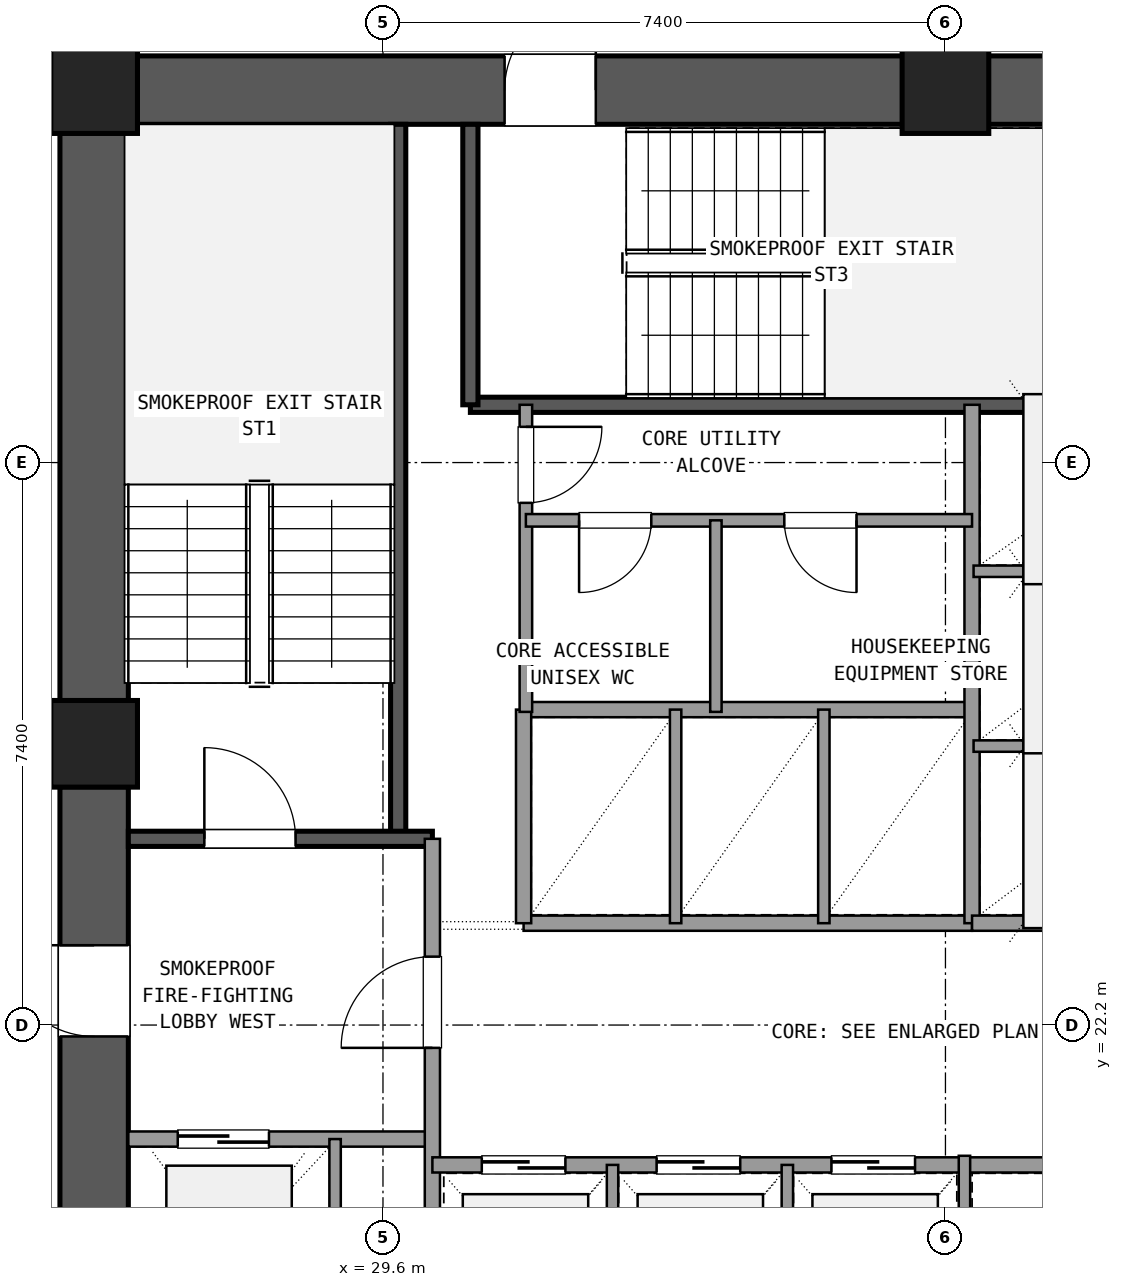
"""IFC4 building model, lengths in metres.
Left out: names, types, materials, properties, quantities, classifications, styles, units other than length and angle.
Written with IfcOpenShell. Run it as: python <this file> out.ifc"""

import sys

from ifc_helpers import new_model, si_unit, direction, frame, frame_2d, origin, origin_2d, place, context, subcontext, project, spatial, rectangle, extrude, element, fill, save


model = new_model("IFC4")
c1 = context("Model", 3, precision=1e-05, world=origin(), true_north=direction((0.0, 1.0)))
c2 = subcontext(c1, "Body", "Model", "MODEL_VIEW")
j1 = project(units=[si_unit("LENGTHUNIT", "METRE"), si_unit("PLANEANGLEUNIT", "RADIAN")], contexts=[c1])
p1 = place(None, origin())
s1 = spatial("IfcSite", under=j1, at=p1, CompositionType="ELEMENT")
p2 = place(p1, origin())
s2 = spatial("IfcBuilding", under=s1, at=p2, CompositionType="ELEMENT")
p3 = place(p2, frame((0.0, 0.0, 27.54)))
s3 = spatial("IfcBuildingStorey", under=s2, at=p3, CompositionType="ELEMENT", Elevation=27.54)
for number, where, z_axis, x_axis in (
    (1, (37.0, 34.5, 0.0), (0.0, 0.0, 1.0), (1.0, 0.0, 0.0)),
    (2, (25.8, 34.5, 0.0), (0.0, 0.0, 1.0), (1.0, 0.0, 0.0)),
    (3, (25.8, 25.9, 0.0), (0.0, 0.0, 1.0), (1.0, 0.0, 0.0)),
):
    element("IfcColumn", number, at=place(p3, frame(where, z_axis=z_axis, x_axis=x_axis)), inside=s3, PredefinedType="COLUMN", context=c2, shape_type="SweptSolid", body=[
        extrude(rectangle(XDim=1.14, YDim=1.14, at=origin_2d()), origin(), (0.0, 0.0, 1.0), 3.6),
    ])
p4 = place(p3, frame((47.635, 34.5, 0.0), z_axis=(0.0, 0.0, 1.0), x_axis=(-1.0, 0.0, 0.0)))
e4 = element("IfcWall", 4, at=p4, inside=s3, PredefinedType="SHEAR", context=c2, shape_type="SweptSolid", body=[
    extrude(rectangle(XDim=10.07, YDim=0.9, at=frame_2d((5.035, 0.0))), origin(), (0.0, 0.0, 1.0), 3.32),
])
p5 = place(p4, frame((4.535, 0.0, 0.0)))
e5 = element("IfcOpeningElement", 5, at=p5, cuts=e4, PredefinedType="OPENING", context=c2, shape_type="SweptSolid", body=[
    extrude(rectangle(XDim=1.6, YDim=2.2, at=frame_2d((0.8, 1.1))), frame((0.0, 0.46, 0.0), z_axis=(0.0, -1.0, 0.0), x_axis=(1.0, 0.0, 0.0)), (0.0, 0.0, 1.0), 0.92),
])
p6 = place(p3, frame((36.435, 34.5, 0.0), z_axis=(0.0, 0.0, 1.0), x_axis=(-1.0, 0.0, 0.0)))
e6 = element("IfcWall", 6, at=p6, inside=s3, PredefinedType="SHEAR", context=c2, shape_type="SweptSolid", body=[
    extrude(rectangle(XDim=10.07, YDim=0.9, at=frame_2d((5.035, 0.0))), origin(), (0.0, 0.0, 1.0), 3.32),
])
p7 = place(p6, frame((4.035, 0.0, 0.0)))
e7 = element("IfcOpeningElement", 7, at=p7, cuts=e6, PredefinedType="OPENING", context=c2, shape_type="SweptSolid", body=[
    extrude(rectangle(XDim=1.2, YDim=2.15, at=frame_2d((0.6, 1.075))), frame((0.0, 0.46, 0.0), z_axis=(0.0, -1.0, 0.0), x_axis=(1.0, 0.0, 0.0)), (0.0, 0.0, 1.0), 0.92),
])
p8 = place(p3, frame((25.8, 33.935, 0.0), z_axis=(0.0, 0.0, 1.0), x_axis=(0.0, -1.0, 0.0)))
e8 = element("IfcWall", 8, at=p8, inside=s3, PredefinedType="SHEAR", context=c2, shape_type="SweptSolid", body=[
    extrude(rectangle(XDim=7.47, YDim=0.9, at=frame_2d((3.735, 0.0))), origin(), (0.0, 0.0, 1.0), 3.32),
])
p9 = place(p3, frame((25.8, 25.335, 0.0), z_axis=(0.0, 0.0, 1.0), x_axis=(0.0, -1.0, 0.0)))
e9 = element("IfcWall", 9, at=p9, inside=s3, PredefinedType="SHEAR", context=c2, shape_type="SweptSolid", body=[
    extrude(rectangle(XDim=7.47, YDim=0.9, at=frame_2d((3.735, 0.0))), origin(), (0.0, 0.0, 1.0), 3.32),
])
p10 = place(p9, frame((2.085, 0.0, 0.0)))
e10 = element("IfcOpeningElement", 10, at=p10, cuts=e9, PredefinedType="OPENING", context=c2, shape_type="SweptSolid", body=[
    extrude(rectangle(XDim=1.2, YDim=2.15, at=frame_2d((0.6, 1.075))), frame((0.0, 0.46, 0.0), z_axis=(0.0, -1.0, 0.0), x_axis=(1.0, 0.0, 0.0)), (0.0, 0.0, 1.0), 0.92),
])
p11 = place(p3, frame((29.8, 24.65, 0.0), z_axis=(0.0, 0.0, 1.0), x_axis=(0.0, 1.0, 0.0)))
e11 = element("IfcWall", 11, at=p11, inside=s3, PredefinedType="SHEAR", context=c2, shape_type="SweptSolid", body=[
    extrude(rectangle(XDim=9.4, YDim=0.2, at=frame_2d((4.7, 0.0))), origin(), (0.0, 0.0, 1.0), 3.32),
])
p12 = place(p3, frame((26.25, 24.65, 0.0), z_axis=(0.0, 0.0, 1.0), x_axis=(1.0, 0.0, 0.0)))
e12 = element("IfcWall", 12, at=p12, inside=s3, PredefinedType="SHEAR", context=c2, shape_type="SweptSolid", body=[
    extrude(rectangle(XDim=4.0, YDim=0.2, at=frame_2d((2.0, 0.0))), origin(), (0.0, 0.0, 1.0), 3.32),
])
p13 = place(p12, frame((1.0, 0.0, 0.0)))
e13 = element("IfcOpeningElement", 13, at=p13, cuts=e12, PredefinedType="OPENING", context=c2, shape_type="SweptSolid", body=[
    extrude(rectangle(XDim=1.2, YDim=2.15, at=frame_2d((0.6, 1.075))), frame((0.0, 0.11, 0.0), z_axis=(0.0, -1.0, 0.0), x_axis=(1.0, 0.0, 0.0)), (0.0, 0.0, 1.0), 0.22),
])
p14 = place(p3, frame((30.75, 30.36, 0.0), z_axis=(0.0, 0.0, 1.0), x_axis=(1.0, 0.0, 0.0)))
e14 = element("IfcWall", 14, at=p14, inside=s3, PredefinedType="SHEAR", context=c2, shape_type="SweptSolid", body=[
    extrude(rectangle(XDim=9.5, YDim=0.2, at=frame_2d((4.75, 0.0))), origin(), (0.0, 0.0, 1.0), 3.32),
])
p15 = place(p3, frame((30.75, 30.36, 0.0), z_axis=(0.0, 0.0, 1.0), x_axis=(0.0, 1.0, 0.0)))
e15 = element("IfcWall", 15, at=p15, inside=s3, PredefinedType="SHEAR", context=c2, shape_type="SweptSolid", body=[
    extrude(rectangle(XDim=3.69, YDim=0.2, at=frame_2d((1.845, 0.0))), origin(), (0.0, 0.0, 1.0), 3.32),
])
p16 = place(p3, frame((26.25, 20.7, 0.0), z_axis=(0.0, 0.0, 1.0), x_axis=(1.0, 0.0, 0.0)))
e16 = element("IfcWall", 16, at=p16, inside=s3, PredefinedType="SOLIDWALL", context=c2, shape_type="SweptSolid", body=[
    extrude(rectangle(XDim=4.0, YDim=0.2, at=frame_2d((2.0, 0.0))), origin(), (0.0, 0.0, 1.0), 2.61),
])
p17 = place(p16, frame((0.65, 0.0, 0.0)))
e17 = element("IfcOpeningElement", 17, at=p17, cuts=e16, PredefinedType="OPENING", context=c2, shape_type="SweptSolid", body=[
    extrude(rectangle(XDim=1.2, YDim=2.15, at=frame_2d((0.6, 1.075))), frame((0.0, 0.11, 0.0), z_axis=(0.0, -1.0, 0.0), x_axis=(1.0, 0.0, 0.0)), (0.0, 0.0, 1.0), 0.22),
])
p18 = place(p3, frame((30.25, 17.75, 0.0), z_axis=(0.0, 0.0, 1.0), x_axis=(0.0, 1.0, 0.0)))
e18 = element("IfcWall", 18, at=p18, inside=s3, PredefinedType="SOLIDWALL", context=c2, shape_type="SweptSolid", body=[
    extrude(rectangle(XDim=6.9, YDim=0.2, at=frame_2d((3.45, 0.0))), origin(), (0.0, 0.0, 1.0), 2.61),
])
p19 = place(p18, frame((4.15, 0.0, 0.0)))
e19 = element("IfcOpeningElement", 19, at=p19, cuts=e18, PredefinedType="OPENING", context=c2, shape_type="SweptSolid", body=[
    extrude(rectangle(XDim=1.2, YDim=2.15, at=frame_2d((0.6, 1.075))), frame((0.0, 0.11, 0.0), z_axis=(0.0, -1.0, 0.0), x_axis=(1.0, 0.0, 0.0)), (0.0, 0.0, 1.0), 0.22),
])
p20 = place(p3, frame((28.97, 17.75, 0.0), z_axis=(0.0, 0.0, 1.0), x_axis=(0.0, 1.0, 0.0)))
e20 = element("IfcWall", 20, at=p20, inside=s3, PredefinedType="PARTITIONING", context=c2, shape_type="SweptSolid", body=[
    extrude(rectangle(XDim=2.95, YDim=0.15, at=frame_2d((1.475, 0.0))), origin(), (0.0, 0.0, 1.0), 2.61),
])
p21 = place(p3, frame((30.25, 20.36, 0.0), z_axis=(0.0, 0.0, 1.0), x_axis=(1.0, 0.0, 0.0)))
e21 = element("IfcWall", 21, at=p21, inside=s3, PredefinedType="SOLIDWALL", context=c2, shape_type="SweptSolid", body=[
    extrude(rectangle(XDim=7.0, YDim=0.2, at=frame_2d((3.5, 0.0))), origin(), (0.0, 0.0, 1.0), 2.61),
])
p22 = place(p21, frame((0.65, 0.0, 0.0)))
e22 = element("IfcOpeningElement", 22, at=p22, cuts=e21, PredefinedType="OPENING", context=c2, shape_type="SweptSolid", body=[
    extrude(rectangle(XDim=1.1, YDim=2.15, at=frame_2d((0.55, 1.075))), frame((0.0, 0.11, 0.0), z_axis=(0.0, -1.0, 0.0), x_axis=(1.0, 0.0, 0.0)), (0.0, 0.0, 1.0), 0.22),
])
p23 = place(p21, frame((2.95, 0.0, 0.0)))
e23 = element("IfcOpeningElement", 23, at=p23, cuts=e21, PredefinedType="OPENING", context=c2, shape_type="SweptSolid", body=[
    extrude(rectangle(XDim=1.1, YDim=2.15, at=frame_2d((0.55, 1.075))), frame((0.0, 0.11, 0.0), z_axis=(0.0, -1.0, 0.0), x_axis=(1.0, 0.0, 0.0)), (0.0, 0.0, 1.0), 0.22),
])
p24 = place(p21, frame((5.25, 0.0, 0.0)))
e24 = element("IfcOpeningElement", 24, at=p24, cuts=e21, PredefinedType="OPENING", context=c2, shape_type="SweptSolid", body=[
    extrude(rectangle(XDim=1.1, YDim=2.15, at=frame_2d((0.55, 1.075))), frame((0.0, 0.11, 0.0), z_axis=(0.0, -1.0, 0.0), x_axis=(1.0, 0.0, 0.0)), (0.0, 0.0, 1.0), 0.22),
])
for number, where, z_axis, x_axis in (
    (25, (32.62, 17.75, 0.0), (0.0, 0.0, 1.0), (0.0, 1.0, 0.0)),
    (26, (34.92, 17.75, 0.0), (0.0, 0.0, 1.0), (0.0, 1.0, 0.0)),
):
    element("IfcWall", number, at=place(p3, frame(where, z_axis=z_axis, x_axis=x_axis)), inside=s3, PredefinedType="PARTITIONING", context=c2, shape_type="SweptSolid", body=[
        extrude(rectangle(XDim=2.61, YDim=0.15, at=frame_2d((1.305, 0.0))), origin(), (0.0, 0.0, 1.0), 2.61),
    ])
p25 = place(p3, frame((37.25, 20.36, 0.0), z_axis=(0.0, 0.0, 1.0), x_axis=(1.0, 0.0, 0.0)))
e27 = element("IfcWall", 27, at=p25, inside=s3, PredefinedType="SOLIDWALL", context=c2, shape_type="SweptSolid", body=[
    extrude(rectangle(XDim=6.1, YDim=0.2, at=frame_2d((3.05, 0.0))), origin(), (0.0, 0.0, 1.0), 2.61),
])
p26 = place(p3, frame((37.25, 17.75, 0.0), z_axis=(0.0, 0.0, 1.0), x_axis=(0.0, 1.0, 0.0)))
e28 = element("IfcWall", 28, at=p26, inside=s3, PredefinedType="PARTITIONING", context=c2, shape_type="SweptSolid", body=[
    extrude(rectangle(XDim=2.73, YDim=0.15, at=frame_2d((1.365, 0.0))), origin(), (0.0, 0.0, 1.0), 2.61),
])
for number, where, z_axis, x_axis in (
    (29, (31.45, 23.54, 0.0), (0.0, 0.0, 1.0), (1.0, 0.0, 0.0)),
    (30, (31.45, 26.35, 0.0), (0.0, 0.0, 1.0), (1.0, 0.0, 0.0)),
):
    element("IfcWall", number, at=place(p3, frame(where, z_axis=z_axis, x_axis=x_axis)), inside=s3, PredefinedType="SOLIDWALL", context=c2, shape_type="SweptSolid", body=[
        extrude(rectangle(XDim=5.9, YDim=0.2, at=frame_2d((2.95, 0.0))), origin(), (0.0, 0.0, 1.0), 2.61),
    ])
p27 = place(p3, frame((31.45, 23.54, 0.0), z_axis=(0.0, 0.0, 1.0), x_axis=(0.0, 1.0, 0.0)))
e31 = element("IfcWall", 31, at=p27, inside=s3, PredefinedType="SOLIDWALL", context=c2, shape_type="SweptSolid", body=[
    extrude(rectangle(XDim=2.81, YDim=0.2, at=frame_2d((1.405, 0.0))), origin(), (0.0, 0.0, 1.0), 2.61),
])
for number, where, z_axis, x_axis in (
    (32, (33.45, 23.54, 0.0), (0.0, 0.0, 1.0), (0.0, 1.0, 0.0)),
    (33, (35.4, 23.54, 0.0), (0.0, 0.0, 1.0), (0.0, 1.0, 0.0)),
):
    element("IfcWall", number, at=place(p3, frame(where, z_axis=z_axis, x_axis=x_axis)), inside=s3, PredefinedType="PARTITIONING", context=c2, shape_type="SweptSolid", body=[
        extrude(rectangle(XDim=2.81, YDim=0.15, at=frame_2d((1.405, 0.0))), origin(), (0.0, 0.0, 1.0), 2.61),
    ])
p28 = place(p3, frame((37.35, 23.54, 0.0), z_axis=(0.0, 0.0, 1.0), x_axis=(0.0, 1.0, 0.0)))
e34 = element("IfcWall", 34, at=p28, inside=s3, PredefinedType="SOLIDWALL", context=c2, shape_type="SweptSolid", body=[
    extrude(rectangle(XDim=6.82, YDim=0.2, at=frame_2d((3.41, 0.0))), origin(), (0.0, 0.0, 1.0), 2.61),
])
p29 = place(p3, frame((37.35, 23.54, 0.0), z_axis=(0.0, 0.0, 1.0), x_axis=(1.0, 0.0, 0.0)))
e35 = element("IfcWall", 35, at=p29, inside=s3, PredefinedType="SOLIDWALL", context=c2, shape_type="SweptSolid", body=[
    extrude(rectangle(XDim=3.05, YDim=0.2, at=frame_2d((1.525, 0.0))), origin(), (0.0, 0.0, 1.0), 2.61),
])
for number, where, z_axis, x_axis in (
    (36, (37.37, 25.87, 0.0), (0.0, 0.0, 1.0), (1.0, 0.0, 0.0)),
    (37, (37.37, 28.17, 0.0), (0.0, 0.0, 1.0), (1.0, 0.0, 0.0)),
):
    element("IfcWall", number, at=place(p3, frame(where, z_axis=z_axis, x_axis=x_axis)), inside=s3, PredefinedType="PARTITIONING", context=c2, shape_type="SweptSolid", body=[
        extrude(rectangle(XDim=3.01, YDim=0.15, at=frame_2d((1.505, 0.0))), origin(), (0.0, 0.0, 1.0), 2.61),
    ])
p30 = place(p3, frame((31.48, 26.32, 0.0), z_axis=(0.0, 0.0, 1.0), x_axis=(0.0, 1.0, 0.0)))
e38 = element("IfcWall", 38, at=p30, inside=s3, PredefinedType="PLUMBINGWALL", context=c2, shape_type="SweptSolid", body=[
    extrude(rectangle(XDim=4.04, YDim=0.165, at=frame_2d((2.02, 0.0))), origin(), (0.0, 0.0, 1.0), 2.61),
])
p31 = place(p30, frame((2.75, 0.0, 0.0)))
e39 = element("IfcOpeningElement", 39, at=p31, cuts=e38, PredefinedType="OPENING", context=c2, shape_type="SweptSolid", body=[
    extrude(rectangle(XDim=1.0, YDim=2.15, at=frame_2d((0.5, 1.075))), frame((0.0, 0.093, 0.0), z_axis=(0.0, -1.0, 0.0), x_axis=(1.0, 0.0, 0.0)), (0.0, 0.0, 1.0), 0.185),
])
p32 = place(p3, frame((31.48, 28.84, 0.0), z_axis=(0.0, 0.0, 1.0), x_axis=(1.0, 0.0, 0.0)))
e40 = element("IfcWall", 40, at=p32, inside=s3, PredefinedType="PLUMBINGWALL", context=c2, shape_type="SweptSolid", body=[
    extrude(rectangle(XDim=5.87, YDim=0.165, at=frame_2d((2.935, 0.0))), origin(), (0.0, 0.0, 1.0), 2.61),
])
p33 = place(p32, frame((0.7, 0.0, 0.0)))
e41 = element("IfcOpeningElement", 41, at=p33, cuts=e40, PredefinedType="OPENING", context=c2, shape_type="SweptSolid", body=[
    extrude(rectangle(XDim=0.95, YDim=2.1, at=frame_2d((0.475, 1.05))), frame((0.0, 0.093, 0.0), z_axis=(0.0, -1.0, 0.0), x_axis=(1.0, 0.0, 0.0)), (0.0, 0.0, 1.0), 0.185),
])
p34 = place(p32, frame((3.4, 0.0, 0.0)))
e42 = element("IfcOpeningElement", 42, at=p34, cuts=e40, PredefinedType="OPENING", context=c2, shape_type="SweptSolid", body=[
    extrude(rectangle(XDim=0.95, YDim=2.1, at=frame_2d((0.475, 1.05))), frame((0.0, 0.093, 0.0), z_axis=(0.0, -1.0, 0.0), x_axis=(1.0, 0.0, 0.0)), (0.0, 0.0, 1.0), 0.185),
])
p35 = place(p3, frame((33.98, 26.32, 0.0), z_axis=(0.0, 0.0, 1.0), x_axis=(0.0, 1.0, 0.0)))
e43 = element("IfcWall", 43, at=p35, inside=s3, PredefinedType="PARTITIONING", context=c2, shape_type="SweptSolid", body=[
    extrude(rectangle(XDim=2.52, YDim=0.15, at=frame_2d((1.26, 0.0))), origin(), (0.0, 0.0, 1.0), 2.61),
])
p36 = place(p3, frame((37.0, 34.95, 0.0), z_axis=(0.0, 0.0, 1.0), x_axis=(0.0, 1.0, 0.0)))
e44 = element("IfcWall", 44, at=p36, inside=s3, PredefinedType="PARTITIONING", context=c2, shape_type="SweptSolid", body=[
    extrude(rectangle(XDim=2.7, YDim=0.18, at=frame_2d((1.35, 0.0))), origin(), (0.0, 0.0, 1.0), 2.61),
])
p37 = place(p36, frame((0.35, 0.0, 0.0)))
e45 = element("IfcOpeningElement", 45, at=p37, cuts=e44, PredefinedType="OPENING", context=c2, shape_type="SweptSolid", body=[
    extrude(rectangle(XDim=2.0, YDim=2.2, at=frame_2d((1.0, 1.1))), frame((0.0, 0.1, 0.0), z_axis=(0.0, -1.0, 0.0), x_axis=(1.0, 0.0, 0.0)), (0.0, 0.0, 1.0), 0.2),
])
p38 = place(p13, origin())
e46 = element("IfcDoor", 46, at=p38, inside=s3, OperationType="SINGLE_SWING_LEFT", PredefinedType="DOOR", context=c2, shape_type="SweptSolid", body=[
    extrude(rectangle(XDim=1.2, YDim=2.15, at=frame_2d((0.6, 1.075))), frame((0.0, 0.025, 0.0), z_axis=(0.0, -1.0, 0.0), x_axis=(1.0, 0.0, 0.0)), (0.0, 0.0, 1.0), 0.05),
])
fill(e13, e46)
p39 = place(p17, origin())
e47 = element("IfcDoor", 47, at=p39, inside=s3, OperationType="SLIDING_TO_LEFT", PredefinedType="DOOR", context=c2, shape_type="SweptSolid", body=[
    extrude(rectangle(XDim=1.2, YDim=2.15, at=frame_2d((0.6, 1.075))), frame((0.0, 0.025, 0.0), z_axis=(0.0, -1.0, 0.0), x_axis=(1.0, 0.0, 0.0)), (0.0, 0.0, 1.0), 0.05),
])
fill(e17, e47)
p40 = place(p19, origin())
e48 = element("IfcDoor", 48, at=p40, inside=s3, OperationType="SINGLE_SWING_LEFT", PredefinedType="DOOR", context=c2, shape_type="SweptSolid", body=[
    extrude(rectangle(XDim=1.2, YDim=2.15, at=frame_2d((0.6, 1.075))), frame((0.0, 0.025, 0.0), z_axis=(0.0, -1.0, 0.0), x_axis=(1.0, 0.0, 0.0)), (0.0, 0.0, 1.0), 0.05),
])
fill(e19, e48)
p41 = place(p10, frame((1.2, 0.0, 0.0), z_axis=(0.0, 0.0, 1.0), x_axis=(-1.0, 0.0, 0.0)))
e49 = element("IfcDoor", 49, at=p41, inside=s3, OperationType="SINGLE_SWING_LEFT", PredefinedType="DOOR", context=c2, shape_type="SweptSolid", body=[
    extrude(rectangle(XDim=1.2, YDim=2.15, at=frame_2d((0.6, 1.075))), frame((0.0, 0.025, 0.0), z_axis=(0.0, -1.0, 0.0), x_axis=(1.0, 0.0, 0.0)), (0.0, 0.0, 1.0), 0.05),
])
fill(e10, e49)
p42 = place(p7, frame((1.2, 0.0, 0.0), z_axis=(0.0, 0.0, 1.0), x_axis=(-1.0, 0.0, 0.0)))
e50 = element("IfcDoor", 50, at=p42, inside=s3, OperationType="SINGLE_SWING_LEFT", PredefinedType="DOOR", context=c2, shape_type="SweptSolid", body=[
    extrude(rectangle(XDim=1.2, YDim=2.15, at=frame_2d((0.6, 1.075))), frame((0.0, 0.025, 0.0), z_axis=(0.0, -1.0, 0.0), x_axis=(1.0, 0.0, 0.0)), (0.0, 0.0, 1.0), 0.05),
])
fill(e7, e50)
p43 = place(p22, origin())
e51 = element("IfcDoor", 51, at=p43, inside=s3, OperationType="SLIDING_TO_LEFT", PredefinedType="DOOR", context=c2, shape_type="SweptSolid", body=[
    extrude(rectangle(XDim=1.1, YDim=2.15, at=frame_2d((0.55, 1.075))), frame((0.0, 0.025, 0.0), z_axis=(0.0, -1.0, 0.0), x_axis=(1.0, 0.0, 0.0)), (0.0, 0.0, 1.0), 0.05),
])
fill(e22, e51)
p44 = place(p23, origin())
e52 = element("IfcDoor", 52, at=p44, inside=s3, OperationType="SLIDING_TO_LEFT", PredefinedType="DOOR", context=c2, shape_type="SweptSolid", body=[
    extrude(rectangle(XDim=1.1, YDim=2.15, at=frame_2d((0.55, 1.075))), frame((0.0, 0.025, 0.0), z_axis=(0.0, -1.0, 0.0), x_axis=(1.0, 0.0, 0.0)), (0.0, 0.0, 1.0), 0.05),
])
fill(e23, e52)
p45 = place(p24, origin())
e53 = element("IfcDoor", 53, at=p45, inside=s3, OperationType="SLIDING_TO_LEFT", PredefinedType="DOOR", context=c2, shape_type="SweptSolid", body=[
    extrude(rectangle(XDim=1.1, YDim=2.15, at=frame_2d((0.55, 1.075))), frame((0.0, 0.025, 0.0), z_axis=(0.0, -1.0, 0.0), x_axis=(1.0, 0.0, 0.0)), (0.0, 0.0, 1.0), 0.05),
])
fill(e24, e53)
p46 = place(p31, frame((1.0, 0.0, 0.0), z_axis=(0.0, 0.0, 1.0), x_axis=(-1.0, 0.0, 0.0)))
e54 = element("IfcDoor", 54, at=p46, inside=s3, OperationType="SINGLE_SWING_RIGHT", PredefinedType="DOOR", context=c2, shape_type="SweptSolid", body=[
    extrude(rectangle(XDim=1.0, YDim=2.15, at=frame_2d((0.5, 1.075))), frame((0.0, 0.025, 0.0), z_axis=(0.0, -1.0, 0.0), x_axis=(1.0, 0.0, 0.0)), (0.0, 0.0, 1.0), 0.05),
])
fill(e39, e54)
p47 = place(p33, frame((0.95, 0.0, 0.0), z_axis=(0.0, 0.0, 1.0), x_axis=(-1.0, 0.0, 0.0)))
e55 = element("IfcDoor", 55, at=p47, inside=s3, OperationType="SINGLE_SWING_LEFT", PredefinedType="DOOR", context=c2, shape_type="SweptSolid", body=[
    extrude(rectangle(XDim=0.95, YDim=2.1, at=frame_2d((0.475, 1.05))), frame((0.0, 0.025, 0.0), z_axis=(0.0, -1.0, 0.0), x_axis=(1.0, 0.0, 0.0)), (0.0, 0.0, 1.0), 0.05),
])
fill(e41, e55)
p48 = place(p34, frame((0.95, 0.0, 0.0), z_axis=(0.0, 0.0, 1.0), x_axis=(-1.0, 0.0, 0.0)))
e56 = element("IfcDoor", 56, at=p48, inside=s3, OperationType="SINGLE_SWING_RIGHT", PredefinedType="DOOR", context=c2, shape_type="SweptSolid", body=[
    extrude(rectangle(XDim=0.95, YDim=2.1, at=frame_2d((0.475, 1.05))), frame((0.0, 0.025, 0.0), z_axis=(0.0, -1.0, 0.0), x_axis=(1.0, 0.0, 0.0)), (0.0, 0.0, 1.0), 0.05),
])
fill(e42, e56)
save(model, sys.argv[1])
